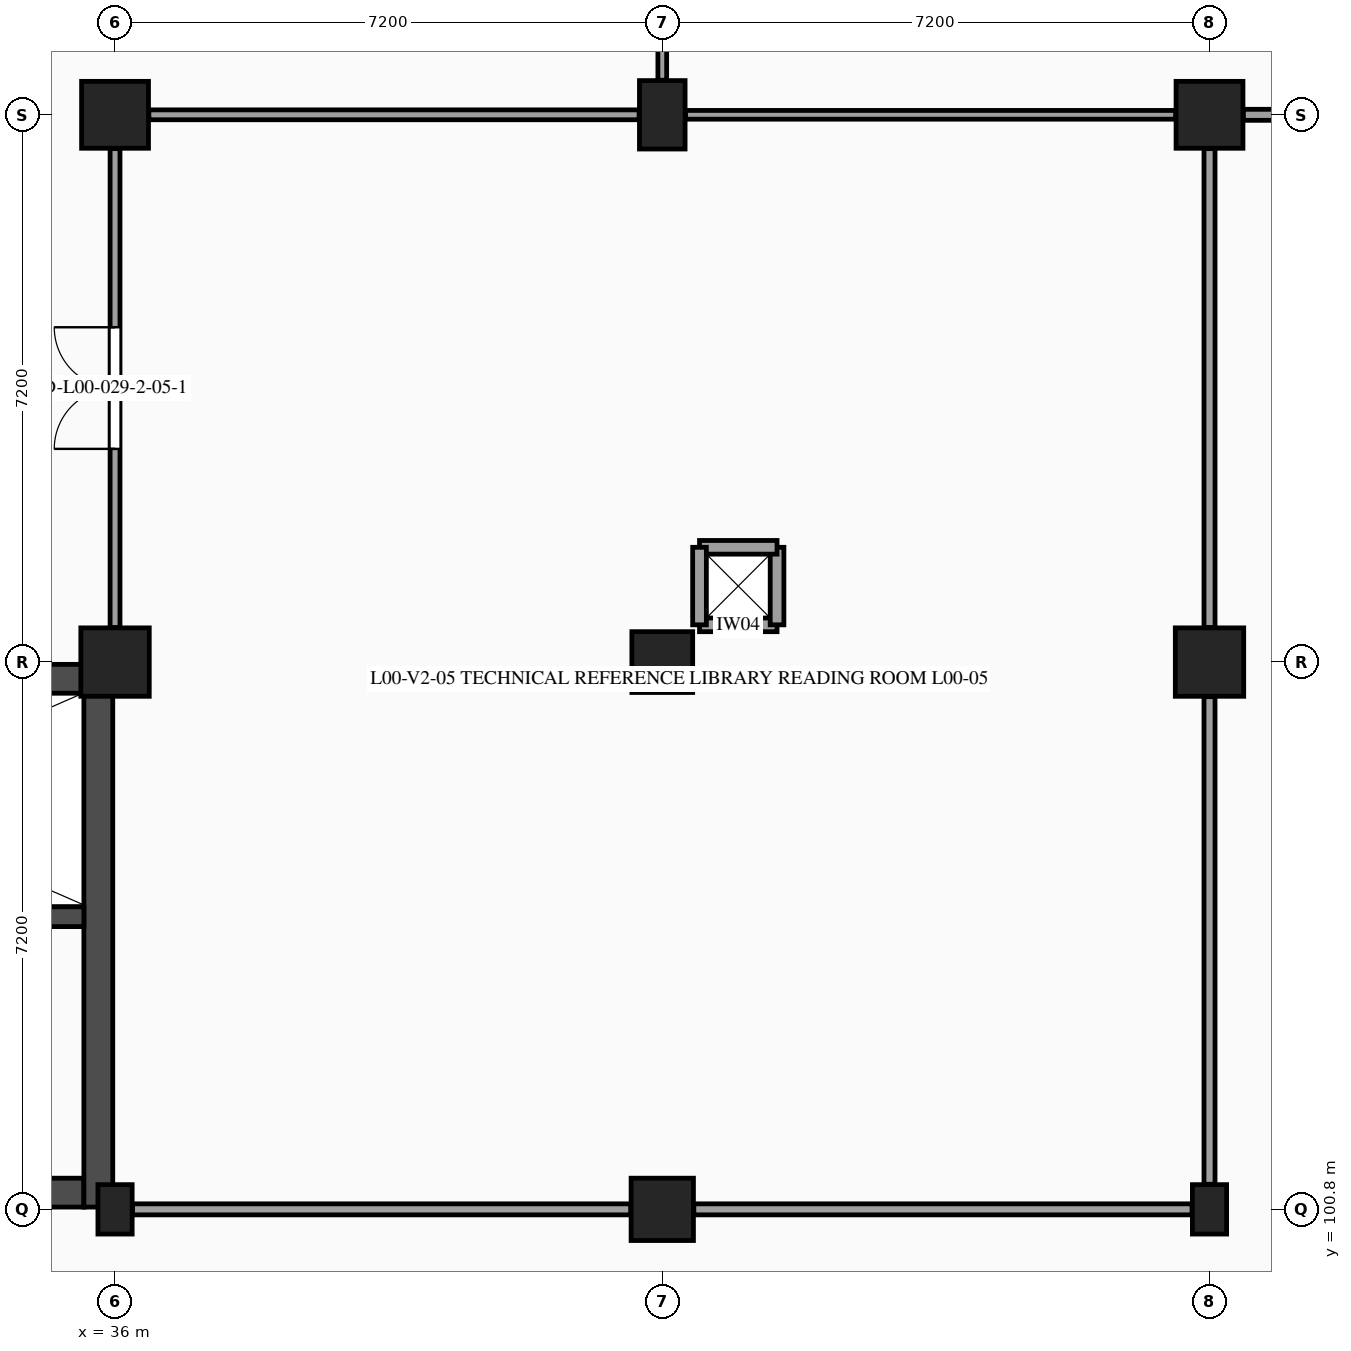
"""IFC4 building model, lengths in metres.
Left out: names, types, materials, properties, quantities, classifications, styles, units other than length and angle.
Written with IfcOpenShell. Run it as: python <this file> out.ifc"""

import sys

from ifc_helpers import new_model, si_unit, direction, frame, frame_2d, origin, origin_2d, place, context, subcontext, project, spatial, rectangle, extrude, element, fill, save


model = new_model("IFC4")
c1 = context("Model", 3, precision=1e-05, world=origin(), true_north=direction((0.0, 1.0)))
c2 = subcontext(c1, "Body", "Model", "MODEL_VIEW")
j1 = project(units=[si_unit("LENGTHUNIT", "METRE"), si_unit("PLANEANGLEUNIT", "RADIAN")], contexts=[c1])
p1 = place(None, origin())
s1 = spatial("IfcSite", under=j1, at=p1, CompositionType="ELEMENT")
p2 = place(p1, origin())
s2 = spatial("IfcBuilding", under=s1, at=p2, CompositionType="ELEMENT")
p3 = place(p2, origin())
s3 = spatial("IfcBuildingStorey", under=s2, at=p3, CompositionType="ELEMENT", Elevation=0.0)
p4 = place(p3, frame((36.0, 100.8, 0.0), z_axis=(0.0, 0.0, 1.0), x_axis=(1.0, 0.0, 0.0)))
e1 = element("IfcColumn", 1, at=p4, inside=s3, PredefinedType="PILASTER", context=c2, shape_type="SweptSolid", body=[
    extrude(rectangle(XDim=0.45, YDim=0.65, at=origin_2d()), origin(), (0.0, 0.0, 1.0), 5.4),
])
p5 = place(p3, frame((36.0, 108.0, 0.0), z_axis=(0.0, 0.0, 1.0), x_axis=(1.0, 0.0, 0.0)))
e2 = element("IfcColumn", 2, at=p5, inside=s3, PredefinedType="COLUMN", context=c2, shape_type="SweptSolid", body=[
    extrude(rectangle(XDim=0.9, YDim=0.9, at=origin_2d()), origin(), (0.0, 0.0, 1.0), 5.4),
])
p6 = place(p3, frame((36.0, 115.2, 0.0), z_axis=(0.0, 0.0, 1.0), x_axis=(1.0, 0.0, 0.0)))
e3 = element("IfcColumn", 3, at=p6, inside=s3, PredefinedType="COLUMN", context=c2, shape_type="SweptSolid", body=[
    extrude(rectangle(XDim=0.88, YDim=0.88, at=origin_2d()), origin(), (0.0, 0.0, 1.0), 5.4),
])
p7 = place(p3, frame((43.2, 100.8, 0.0), z_axis=(0.0, 0.0, 1.0), x_axis=(1.0, 0.0, 0.0)))
e4 = element("IfcColumn", 4, at=p7, inside=s3, PredefinedType="COLUMN", context=c2, shape_type="SweptSolid", body=[
    extrude(rectangle(XDim=0.82, YDim=0.82, at=origin_2d()), origin(), (0.0, 0.0, 1.0), 5.4),
])
p8 = place(p3, frame((43.2, 108.0, 0.0), z_axis=(0.0, 0.0, 1.0), x_axis=(1.0, 0.0, 0.0)))
e5 = element("IfcColumn", 5, at=p8, inside=s3, PredefinedType="COLUMN", context=c2, shape_type="SweptSolid", body=[
    extrude(rectangle(XDim=0.8, YDim=0.8, at=origin_2d()), origin(), (0.0, 0.0, 1.0), 5.4),
])
p9 = place(p3, frame((43.2, 115.2, 0.0), z_axis=(0.0, 0.0, 1.0), x_axis=(1.0, 0.0, 0.0)))
e6 = element("IfcColumn", 6, at=p9, inside=s3, PredefinedType="COLUMN", context=c2, shape_type="SweptSolid", body=[
    extrude(rectangle(XDim=0.6, YDim=0.9, at=origin_2d()), origin(), (0.0, 0.0, 1.0), 5.4),
])
p10 = place(p3, frame((50.4, 100.8, 0.0), z_axis=(0.0, 0.0, 1.0), x_axis=(1.0, 0.0, 0.0)))
e7 = element("IfcColumn", 7, at=p10, inside=s3, PredefinedType="PILASTER", context=c2, shape_type="SweptSolid", body=[
    extrude(rectangle(XDim=0.45, YDim=0.65, at=origin_2d()), origin(), (0.0, 0.0, 1.0), 5.4),
])
p11 = place(p3, frame((50.4, 108.0, 0.0), z_axis=(0.0, 0.0, 1.0), x_axis=(1.0, 0.0, 0.0)))
e8 = element("IfcColumn", 8, at=p11, inside=s3, PredefinedType="COLUMN", context=c2, shape_type="SweptSolid", body=[
    extrude(rectangle(XDim=0.9, YDim=0.9, at=origin_2d()), origin(), (0.0, 0.0, 1.0), 5.4),
])
p12 = place(p3, frame((50.4, 115.2, 0.0), z_axis=(0.0, 0.0, 1.0), x_axis=(1.0, 0.0, 0.0)))
e9 = element("IfcColumn", 9, at=p12, inside=s3, PredefinedType="COLUMN", context=c2, shape_type="SweptSolid", body=[
    extrude(rectangle(XDim=0.88, YDim=0.88, at=origin_2d()), origin(), (0.0, 0.0, 1.0), 5.4),
])
p13 = place(p3, frame((28.99, 101.02, 0.0), z_axis=(0.0, 0.0, 1.0), x_axis=(1.0, 0.0, 0.0)))
e10 = element("IfcWall", 10, at=p13, inside=s3, PredefinedType="SHEAR", context=c2, shape_type="SweptSolid", body=[
    extrude(rectangle(XDim=6.6, YDim=0.38, at=frame_2d((3.3, 0.0))), origin(), (0.0, 0.0, 1.0), 5.09),
])
p14 = place(p13, frame((2.22, 0.0, 0.0)))
e11 = element("IfcOpeningElement", 11, at=p14, cuts=e10, PredefinedType="OPENING", context=c2, shape_type="SweptSolid", body=[
    extrude(rectangle(XDim=1.8, YDim=2.2, at=frame_2d((0.9, 1.1))), frame((0.0, 0.2, 0.0), z_axis=(0.0, -1.0, 0.0), x_axis=(1.0, 0.0, 0.0)), (0.0, 0.0, 1.0), 0.4),
])
p15 = place(p3, frame((35.78, 100.83, 0.0), z_axis=(0.0, 0.0, 1.0), x_axis=(0.0, 1.0, 0.0)))
e12 = element("IfcWall", 12, at=p15, inside=s3, PredefinedType="SHEAR", context=c2, shape_type="SweptSolid", body=[
    extrude(rectangle(XDim=7.14, YDim=0.38, at=frame_2d((3.57, 0.0))), origin(), (0.0, 0.0, 1.0), 5.09),
])
p16 = place(p3, frame((28.99, 107.78, 0.0), z_axis=(0.0, 0.0, 1.0), x_axis=(1.0, 0.0, 0.0)))
e13 = element("IfcWall", 13, at=p16, inside=s3, PredefinedType="SHEAR", context=c2, shape_type="SweptSolid", body=[
    extrude(rectangle(XDim=6.6, YDim=0.38, at=frame_2d((3.3, 0.0))), origin(), (0.0, 0.0, 1.0), 5.09),
])
p17 = place(p3, frame((28.99, 104.65, 0.0), z_axis=(0.0, 0.0, 1.0), x_axis=(1.0, 0.0, 0.0)))
e14 = element("IfcWall", 14, at=p17, inside=s3, PredefinedType="SHEAR", context=c2, shape_type="SweptSolid", body=[
    extrude(rectangle(XDim=6.6, YDim=0.26, at=frame_2d((3.3, 0.0))), origin(), (0.0, 0.0, 1.0), 5.09),
])
p18 = place(p17, frame((0.95, 0.0, 0.0)))
e15 = element("IfcOpeningElement", 15, at=p18, cuts=e14, PredefinedType="OPENING", context=c2, shape_type="SweptSolid", body=[
    extrude(rectangle(XDim=1.1, YDim=2.2, at=frame_2d((0.55, 1.1))), frame((0.0, 0.14, 0.0), z_axis=(0.0, -1.0, 0.0), x_axis=(1.0, 0.0, 0.0)), (0.0, 0.0, 1.0), 0.28),
])
p19 = place(p17, frame((4.1, 0.0, 0.0)))
e16 = element("IfcOpeningElement", 16, at=p19, cuts=e14, PredefinedType="OPENING", context=c2, shape_type="SweptSolid", body=[
    extrude(rectangle(XDim=1.0, YDim=2.15, at=frame_2d((0.5, 1.075))), frame((0.0, 0.14, 0.0), z_axis=(0.0, -1.0, 0.0), x_axis=(1.0, 0.0, 0.0)), (0.0, 0.0, 1.0), 0.28),
])
for number, where, z_axis, x_axis in (
    (17, (43.69, 108.49, 0.0), (0.0, 0.0, 1.0), (1.0, 0.0, 0.0)),
    (18, (44.71, 108.49, 0.0), (0.0, 0.0, 1.0), (0.0, 1.0, 0.0)),
    (19, (44.71, 109.51, 0.0), (0.0, 0.0, 1.0), (-1.0, 0.0, 0.0)),
    (20, (43.69, 109.51, 0.0), (0.0, 0.0, 1.0), (0.0, -1.0, 0.0)),
):
    element("IfcWall", number, at=place(p3, frame(where, z_axis=z_axis, x_axis=x_axis)), inside=s3, PredefinedType="PARTITIONING", context=c2, shape_type="SweptSolid", body=[
        extrude(rectangle(XDim=1.02, YDim=0.18, at=frame_2d((0.51, 0.0))), origin(), (0.0, 0.0, 1.0), 5.09),
    ])
p20 = place(p3, frame((36.0, 108.455, 0.0), z_axis=(0.0, 0.0, 1.0), x_axis=(0.0, 1.0, 0.0)))
e21 = element("IfcWall", 21, at=p20, inside=s3, PredefinedType="PARTITIONING", context=c2, shape_type="SweptSolid", body=[
    extrude(rectangle(XDim=6.3, YDim=0.13, at=frame_2d((3.15, 0.0))), origin(), (0.0, 0.0, 1.0), 4.405),
])
p21 = place(p20, frame((2.35, 0.0, 0.0)))
e22 = element("IfcOpeningElement", 22, at=p21, cuts=e21, PredefinedType="OPENING", context=c2, shape_type="SweptSolid", body=[
    extrude(rectangle(XDim=1.6, YDim=2.2, at=frame_2d((0.8, 1.1))), frame((0.0, 0.075, 0.0), z_axis=(0.0, -1.0, 0.0), x_axis=(1.0, 0.0, 0.0)), (0.0, 0.0, 1.0), 0.15),
])
p22 = place(p3, frame((36.23, 100.8, 0.0), z_axis=(0.0, 0.0, 1.0), x_axis=(1.0, 0.0, 0.0)))
e23 = element("IfcWall", 23, at=p22, inside=s3, PredefinedType="PARTITIONING", context=c2, shape_type="SweptSolid", body=[
    extrude(rectangle(XDim=6.555, YDim=0.145, at=frame_2d((3.277, 0.0))), origin(), (0.0, 0.0, 1.0), 4.39),
])
p23 = place(p3, frame((36.445, 115.2, 0.0), z_axis=(0.0, 0.0, 1.0), x_axis=(1.0, 0.0, 0.0)))
e24 = element("IfcWall", 24, at=p23, inside=s3, PredefinedType="PARTITIONING", context=c2, shape_type="SweptSolid", body=[
    extrude(rectangle(XDim=6.45, YDim=0.13, at=frame_2d((3.225, 0.0))), origin(), (0.0, 0.0, 1.0), 4.39),
])
p24 = place(p3, frame((43.2, 115.655, 0.0), z_axis=(0.0, 0.0, 1.0), x_axis=(0.0, 1.0, 0.0)))
e25 = element("IfcWall", 25, at=p24, inside=s3, PredefinedType="PARTITIONING", context=c2, shape_type="SweptSolid", body=[
    extrude(rectangle(XDim=6.415, YDim=0.115, at=frame_2d((3.208, 0.0))), origin(), (0.0, 0.0, 1.0), 4.405),
])
p25 = place(p24, frame((2.407, 0.0, 0.0)))
e26 = element("IfcOpeningElement", 26, at=p25, cuts=e25, PredefinedType="OPENING", context=c2, shape_type="SweptSolid", body=[
    extrude(rectangle(XDim=1.6, YDim=2.2, at=frame_2d((0.8, 1.1))), frame((0.0, 0.067, 0.0), z_axis=(0.0, -1.0, 0.0), x_axis=(1.0, 0.0, 0.0)), (0.0, 0.0, 1.0), 0.135),
])
p26 = place(p3, frame((43.615, 100.8, 0.0), z_axis=(0.0, 0.0, 1.0), x_axis=(1.0, 0.0, 0.0)))
e27 = element("IfcWall", 27, at=p26, inside=s3, PredefinedType="PARTITIONING", context=c2, shape_type="SweptSolid", body=[
    extrude(rectangle(XDim=6.555, YDim=0.145, at=frame_2d((3.277, 0.0))), origin(), (0.0, 0.0, 1.0), 4.43),
])
p27 = place(p3, frame((50.4, 101.13, 0.0), z_axis=(0.0, 0.0, 1.0), x_axis=(0.0, 1.0, 0.0)))
e28 = element("IfcWall", 28, at=p27, inside=s3, PredefinedType="PARTITIONING", context=c2, shape_type="SweptSolid", body=[
    extrude(rectangle(XDim=6.415, YDim=0.145, at=frame_2d((3.208, 0.0))), origin(), (0.0, 0.0, 1.0), 4.455),
])
p28 = place(p3, frame((50.4, 108.455, 0.0), z_axis=(0.0, 0.0, 1.0), x_axis=(0.0, 1.0, 0.0)))
e29 = element("IfcWall", 29, at=p28, inside=s3, PredefinedType="PARTITIONING", context=c2, shape_type="SweptSolid", body=[
    extrude(rectangle(XDim=6.3, YDim=0.145, at=frame_2d((3.15, 0.0))), origin(), (0.0, 0.0, 1.0), 4.405),
])
p29 = place(p3, frame((43.505, 115.2, 0.0), z_axis=(0.0, 0.0, 1.0), x_axis=(1.0, 0.0, 0.0)))
e30 = element("IfcWall", 30, at=p29, inside=s3, PredefinedType="PARTITIONING", context=c2, shape_type="SweptSolid", body=[
    extrude(rectangle(XDim=6.45, YDim=0.115, at=frame_2d((3.225, 0.0))), origin(), (0.0, 0.0, 1.0), 4.43),
])
p30 = place(p3, frame((50.845, 115.2, 0.0), z_axis=(0.0, 0.0, 1.0), x_axis=(1.0, 0.0, 0.0)))
e31 = element("IfcWall", 31, at=p30, inside=s3, PredefinedType="PARTITIONING", context=c2, shape_type="SweptSolid", body=[
    extrude(rectangle(XDim=6.45, YDim=0.145, at=frame_2d((3.225, 0.0))), origin(), (0.0, 0.0, 1.0), 4.44),
])
p31 = place(p21, origin())
e32 = element("IfcDoor", 32, at=p31, inside=s3, OperationType="DOUBLE_DOOR_SINGLE_SWING", PredefinedType="DOOR", context=c2, shape_type="SweptSolid", body=[
    extrude(rectangle(XDim=1.6, YDim=2.2, at=frame_2d((0.8, 1.1))), frame((0.0, 0.025, 0.0), z_axis=(0.0, -1.0, 0.0), x_axis=(1.0, 0.0, 0.0)), (0.0, 0.0, 1.0), 0.05),
])
fill(e22, e32)
save(model, sys.argv[1])
